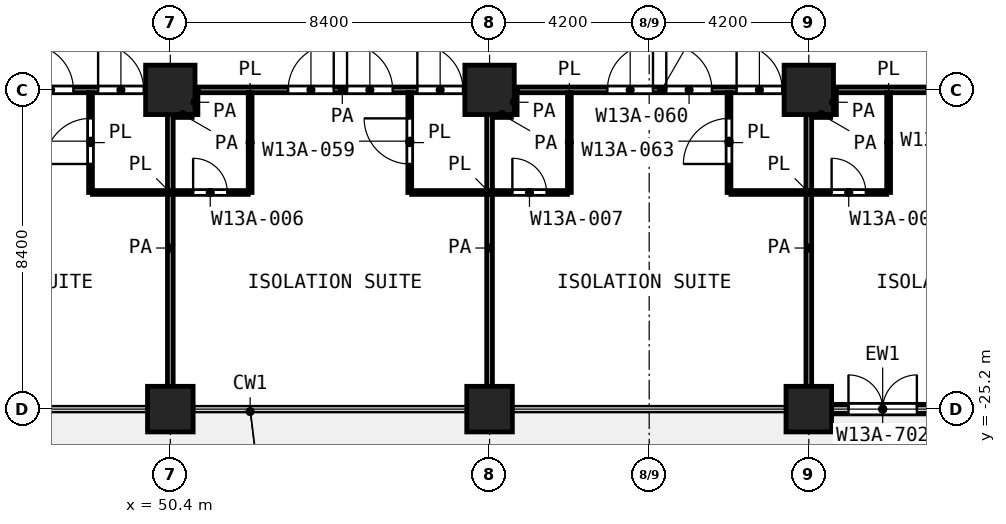
"""IFC4 building model, lengths in metres.
Left out: names, types, materials, properties, quantities, classifications, styles, units other than length and angle.
Written with IfcOpenShell. Run it as: python <this file> out.ifc"""

import sys

from ifc_helpers import new_model, si_unit, direction, frame, frame_2d, origin, origin_2d, place, context, subcontext, project, spatial, rectangle, extrude, element, fill, save


model = new_model("IFC4")
c1 = context("Model", 3, precision=1e-05, world=origin(), true_north=direction((0.0, 1.0)))
c2 = subcontext(c1, "Body", "Model", "MODEL_VIEW")
j1 = project(units=[si_unit("LENGTHUNIT", "METRE"), si_unit("PLANEANGLEUNIT", "RADIAN")], contexts=[c1])
p1 = place(None, origin())
s1 = spatial("IfcSite", under=j1, at=p1, CompositionType="ELEMENT")
p2 = place(p1, origin())
s2 = spatial("IfcBuilding", under=s1, at=p2, CompositionType="ELEMENT")
p3 = place(p2, frame((0.0, 0.0, 60.2)))
s3 = spatial("IfcBuildingStorey", under=s2, at=p3, CompositionType="ELEMENT", Elevation=60.2)
for number, where, z_axis, x_axis in (
    (1, (50.4, -16.8, 0.0), (0.0, 0.0, 1.0), (1.0, 0.0, 0.0)),
    (2, (58.8, -16.8, 0.0), (0.0, 0.0, 1.0), (1.0, 0.0, 0.0)),
    (3, (67.2, -16.8, 0.0), (0.0, 0.0, 1.0), (1.0, 0.0, 0.0)),
):
    element("IfcColumn", number, at=place(p3, frame(where, z_axis=z_axis, x_axis=x_axis)), inside=s3, PredefinedType="COLUMN", context=c2, shape_type="SweptSolid", body=[
        extrude(rectangle(XDim=1.3, YDim=1.3, at=origin_2d()), origin(), (0.0, 0.0, 1.0), 4.2),
    ])
for number, where, z_axis, x_axis in (
    (4, (50.4, -25.2, 0.0), (0.0, 0.0, 1.0), (1.0, 0.0, 0.0)),
    (5, (58.8, -25.2, 0.0), (0.0, 0.0, 1.0), (1.0, 0.0, 0.0)),
    (6, (67.2, -25.2, 0.0), (0.0, 0.0, 1.0), (1.0, 0.0, 0.0)),
):
    element("IfcColumn", number, at=place(p3, frame(where, z_axis=z_axis, x_axis=x_axis)), inside=s3, PredefinedType="COLUMN", context=c2, shape_type="SweptSolid", body=[
        extrude(rectangle(XDim=1.2, YDim=1.2, at=origin_2d()), origin(), (0.0, 0.0, 1.0), 4.2),
    ])
p4 = place(p3, frame((67.8, -25.2, 0.0), z_axis=(0.0, 0.0, 1.0), x_axis=(1.0, 0.0, 0.0)))
e7 = element("IfcWall", 7, at=p4, inside=s3, PredefinedType="SOLIDWALL", context=c2, shape_type="SweptSolid", body=[
    extrude(rectangle(XDim=2.688, YDim=0.25, at=frame_2d((1.344, 0.0))), origin(), (0.0, 0.0, 1.0), 3.78),
])
p5 = place(p4, frame((0.444, 0.0, 0.0)))
e8 = element("IfcOpeningElement", 8, at=p5, cuts=e7, PredefinedType="OPENING", context=c2, shape_type="SweptSolid", body=[
    extrude(rectangle(XDim=1.8, YDim=2.1, at=frame_2d((0.9, 1.05))), frame((0.0, 0.135, 0.0), z_axis=(0.0, -1.0, 0.0), x_axis=(1.0, 0.0, 0.0)), (0.0, 0.0, 1.0), 0.27),
])
p6 = place(p3, frame((48.35, -19.5, 0.0), z_axis=(0.0, 0.0, 1.0), x_axis=(1.0, 0.0, 0.0)))
e9 = element("IfcWall", 9, at=p6, inside=s3, PredefinedType="PARTITIONING", context=c2, shape_type="SweptSolid", body=[
    extrude(rectangle(XDim=4.1, YDim=0.1, at=frame_2d((2.05, 0.0))), origin(), (0.0, 0.0, 1.0), 3.9),
])
p7 = place(p6, frame((2.65, 0.0, 0.0)))
e10 = element("IfcOpeningElement", 10, at=p7, cuts=e9, PredefinedType="OPENING", context=c2, shape_type="SweptSolid", body=[
    extrude(rectangle(XDim=0.9, YDim=2.1, at=frame_2d((0.45, 1.05))), frame((0.0, 0.06, 0.0), z_axis=(0.0, -1.0, 0.0), x_axis=(1.0, 0.0, 0.0)), (0.0, 0.0, 1.0), 0.12),
])
p8 = place(p3, frame((56.75, -19.5, 0.0), z_axis=(0.0, 0.0, 1.0), x_axis=(1.0, 0.0, 0.0)))
e11 = element("IfcWall", 11, at=p8, inside=s3, PredefinedType="PARTITIONING", context=c2, shape_type="SweptSolid", body=[
    extrude(rectangle(XDim=4.1, YDim=0.1, at=frame_2d((2.05, 0.0))), origin(), (0.0, 0.0, 1.0), 3.9),
])
p9 = place(p8, frame((2.65, 0.0, 0.0)))
e12 = element("IfcOpeningElement", 12, at=p9, cuts=e11, PredefinedType="OPENING", context=c2, shape_type="SweptSolid", body=[
    extrude(rectangle(XDim=0.9, YDim=2.1, at=frame_2d((0.45, 1.05))), frame((0.0, 0.06, 0.0), z_axis=(0.0, -1.0, 0.0), x_axis=(1.0, 0.0, 0.0)), (0.0, 0.0, 1.0), 0.12),
])
p10 = place(p3, frame((65.15, -19.5, 0.0), z_axis=(0.0, 0.0, 1.0), x_axis=(1.0, 0.0, 0.0)))
e13 = element("IfcWall", 13, at=p10, inside=s3, PredefinedType="PARTITIONING", context=c2, shape_type="SweptSolid", body=[
    extrude(rectangle(XDim=4.1, YDim=0.1, at=frame_2d((2.05, 0.0))), origin(), (0.0, 0.0, 1.0), 3.9),
])
p11 = place(p10, frame((2.65, 0.0, 0.0)))
e14 = element("IfcOpeningElement", 14, at=p11, cuts=e13, PredefinedType="OPENING", context=c2, shape_type="SweptSolid", body=[
    extrude(rectangle(XDim=0.9, YDim=2.1, at=frame_2d((0.45, 1.05))), frame((0.0, 0.06, 0.0), z_axis=(0.0, -1.0, 0.0), x_axis=(1.0, 0.0, 0.0)), (0.0, 0.0, 1.0), 0.12),
])
p12 = place(p3, frame((48.3, -19.5, 0.0), z_axis=(0.0, 0.0, 1.0), x_axis=(0.0, 1.0, 0.0)))
e15 = element("IfcWall", 15, at=p12, inside=s3, PredefinedType="PARTITIONING", context=c2, shape_type="SweptSolid", body=[
    extrude(rectangle(XDim=2.625, YDim=0.1, at=frame_2d((1.312, 0.0))), origin(), (0.0, 0.0, 1.0), 3.9),
])
p13 = place(p12, frame((0.75, 0.0, 0.0)))
e16 = element("IfcOpeningElement", 16, at=p13, cuts=e15, PredefinedType="OPENING", context=c2, shape_type="SweptSolid", body=[
    extrude(rectangle(XDim=1.2, YDim=2.1, at=frame_2d((0.6, 1.05))), frame((0.0, 0.06, 0.0), z_axis=(0.0, -1.0, 0.0), x_axis=(1.0, 0.0, 0.0)), (0.0, 0.0, 1.0), 0.12),
])
p14 = place(p3, frame((52.5, -19.5, 0.0), z_axis=(0.0, 0.0, 1.0), x_axis=(0.0, 1.0, 0.0)))
e17 = element("IfcWall", 17, at=p14, inside=s3, PredefinedType="PARTITIONING", context=c2, shape_type="SweptSolid", body=[
    extrude(rectangle(XDim=2.625, YDim=0.1, at=frame_2d((1.312, 0.0))), origin(), (0.0, 0.0, 1.0), 3.9),
])
p15 = place(p3, frame((56.7, -19.5, 0.0), z_axis=(0.0, 0.0, 1.0), x_axis=(0.0, 1.0, 0.0)))
e18 = element("IfcWall", 18, at=p15, inside=s3, PredefinedType="PARTITIONING", context=c2, shape_type="SweptSolid", body=[
    extrude(rectangle(XDim=2.625, YDim=0.1, at=frame_2d((1.312, 0.0))), origin(), (0.0, 0.0, 1.0), 3.9),
])
p16 = place(p15, frame((0.75, 0.0, 0.0)))
e19 = element("IfcOpeningElement", 19, at=p16, cuts=e18, PredefinedType="OPENING", context=c2, shape_type="SweptSolid", body=[
    extrude(rectangle(XDim=1.2, YDim=2.1, at=frame_2d((0.6, 1.05))), frame((0.0, 0.06, 0.0), z_axis=(0.0, -1.0, 0.0), x_axis=(1.0, 0.0, 0.0)), (0.0, 0.0, 1.0), 0.12),
])
p17 = place(p3, frame((60.9, -19.5, 0.0), z_axis=(0.0, 0.0, 1.0), x_axis=(0.0, 1.0, 0.0)))
e20 = element("IfcWall", 20, at=p17, inside=s3, PredefinedType="PARTITIONING", context=c2, shape_type="SweptSolid", body=[
    extrude(rectangle(XDim=2.625, YDim=0.1, at=frame_2d((1.312, 0.0))), origin(), (0.0, 0.0, 1.0), 3.9),
])
p18 = place(p3, frame((65.1, -19.5, 0.0), z_axis=(0.0, 0.0, 1.0), x_axis=(0.0, 1.0, 0.0)))
e21 = element("IfcWall", 21, at=p18, inside=s3, PredefinedType="PARTITIONING", context=c2, shape_type="SweptSolid", body=[
    extrude(rectangle(XDim=2.625, YDim=0.1, at=frame_2d((1.312, 0.0))), origin(), (0.0, 0.0, 1.0), 3.9),
])
p19 = place(p18, frame((0.75, 0.0, 0.0)))
e22 = element("IfcOpeningElement", 22, at=p19, cuts=e21, PredefinedType="OPENING", context=c2, shape_type="SweptSolid", body=[
    extrude(rectangle(XDim=1.2, YDim=2.1, at=frame_2d((0.6, 1.05))), frame((0.0, 0.06, 0.0), z_axis=(0.0, -1.0, 0.0), x_axis=(1.0, 0.0, 0.0)), (0.0, 0.0, 1.0), 0.12),
])
p20 = place(p3, frame((69.3, -19.5, 0.0), z_axis=(0.0, 0.0, 1.0), x_axis=(0.0, 1.0, 0.0)))
e23 = element("IfcWall", 23, at=p20, inside=s3, PredefinedType="PARTITIONING", context=c2, shape_type="SweptSolid", body=[
    extrude(rectangle(XDim=2.625, YDim=0.1, at=frame_2d((1.312, 0.0))), origin(), (0.0, 0.0, 1.0), 3.9),
])
for number, where, z_axis, x_axis in (
    (24, (50.475, -17.45, 0.0), (0.0, 0.0, 1.0), (1.0, 0.0, 0.0)),
    (25, (58.875, -17.45, 0.0), (0.0, 0.0, 1.0), (1.0, 0.0, 0.0)),
    (26, (67.275, -17.45, 0.0), (0.0, 0.0, 1.0), (1.0, 0.0, 0.0)),
):
    element("IfcWall", number, at=place(p3, frame(where, z_axis=z_axis, x_axis=x_axis)), inside=s3, PredefinedType="PARTITIONING", context=c2, shape_type="SweptSolid", body=[
        extrude(rectangle(XDim=0.5, YDim=0.15, at=frame_2d((0.25, 0.0))), origin(), (0.0, 0.0, 1.0), 3.9),
    ])
p21 = place(p3, frame((42.727, -16.8, 0.0), z_axis=(0.0, 0.0, 1.0), x_axis=(1.0, 0.0, 0.0)))
e27 = element("IfcWall", 27, at=p21, inside=s3, PredefinedType="PARTITIONING", context=c2, shape_type="SweptSolid", body=[
    extrude(rectangle(XDim=7.595, YDim=0.15, at=frame_2d((3.797, 0.0))), origin(), (0.0, 0.0, 1.0), 3.9),
])
p22 = place(p21, frame((3.923, 0.0, 0.0)))
e28 = element("IfcOpeningElement", 28, at=p22, cuts=e27, PredefinedType="OPENING", context=c2, shape_type="SweptSolid", body=[
    extrude(rectangle(XDim=1.2, YDim=2.1, at=frame_2d((0.6, 1.05))), frame((0.0, 0.085, 0.0), z_axis=(0.0, -1.0, 0.0), x_axis=(1.0, 0.0, 0.0)), (0.0, 0.0, 1.0), 0.17),
])
p23 = place(p21, frame((2.373, 0.0, 0.0)))
e29 = element("IfcOpeningElement", 29, at=p23, cuts=e27, PredefinedType="OPENING", context=c2, shape_type="SweptSolid", body=[
    extrude(rectangle(XDim=1.2, YDim=2.1, at=frame_2d((0.6, 1.05))), frame((0.0, 0.085, 0.0), z_axis=(0.0, -1.0, 0.0), x_axis=(1.0, 0.0, 0.0)), (0.0, 0.0, 1.0), 0.17),
])
p24 = place(p21, frame((5.773, 0.0, 0.0)))
e30 = element("IfcOpeningElement", 30, at=p24, cuts=e27, PredefinedType="OPENING", context=c2, shape_type="SweptSolid", body=[
    extrude(rectangle(XDim=1.2, YDim=2.1, at=frame_2d((0.6, 1.05))), frame((0.0, 0.085, 0.0), z_axis=(0.0, -1.0, 0.0), x_axis=(1.0, 0.0, 0.0)), (0.0, 0.0, 1.0), 0.17),
])
p25 = place(p3, frame((51.128, -16.8, 0.0), z_axis=(0.0, 0.0, 1.0), x_axis=(1.0, 0.0, 0.0)))
e31 = element("IfcWall", 31, at=p25, inside=s3, PredefinedType="PARTITIONING", context=c2, shape_type="SweptSolid", body=[
    extrude(rectangle(XDim=7.594, YDim=0.15, at=frame_2d((3.797, 0.0))), origin(), (0.0, 0.0, 1.0), 3.9),
])
p26 = place(p25, frame((3.922, 0.0, 0.0)))
e32 = element("IfcOpeningElement", 32, at=p26, cuts=e31, PredefinedType="OPENING", context=c2, shape_type="SweptSolid", body=[
    extrude(rectangle(XDim=1.2, YDim=2.1, at=frame_2d((0.6, 1.05))), frame((0.0, 0.085, 0.0), z_axis=(0.0, -1.0, 0.0), x_axis=(1.0, 0.0, 0.0)), (0.0, 0.0, 1.0), 0.17),
])
p27 = place(p25, frame((2.372, 0.0, 0.0)))
e33 = element("IfcOpeningElement", 33, at=p27, cuts=e31, PredefinedType="OPENING", context=c2, shape_type="SweptSolid", body=[
    extrude(rectangle(XDim=1.2, YDim=2.1, at=frame_2d((0.6, 1.05))), frame((0.0, 0.085, 0.0), z_axis=(0.0, -1.0, 0.0), x_axis=(1.0, 0.0, 0.0)), (0.0, 0.0, 1.0), 0.17),
])
p28 = place(p25, frame((5.772, 0.0, 0.0)))
e34 = element("IfcOpeningElement", 34, at=p28, cuts=e31, PredefinedType="OPENING", context=c2, shape_type="SweptSolid", body=[
    extrude(rectangle(XDim=1.2, YDim=2.1, at=frame_2d((0.6, 1.05))), frame((0.0, 0.085, 0.0), z_axis=(0.0, -1.0, 0.0), x_axis=(1.0, 0.0, 0.0)), (0.0, 0.0, 1.0), 0.17),
])
p29 = place(p3, frame((59.528, -16.8, 0.0), z_axis=(0.0, 0.0, 1.0), x_axis=(1.0, 0.0, 0.0)))
e35 = element("IfcWall", 35, at=p29, inside=s3, PredefinedType="PARTITIONING", context=c2, shape_type="SweptSolid", body=[
    extrude(rectangle(XDim=7.594, YDim=0.15, at=frame_2d((3.797, 0.0))), origin(), (0.0, 0.0, 1.0), 3.9),
])
p30 = place(p29, frame((3.922, 0.0, 0.0)))
e36 = element("IfcOpeningElement", 36, at=p30, cuts=e35, PredefinedType="OPENING", context=c2, shape_type="SweptSolid", body=[
    extrude(rectangle(XDim=1.2, YDim=2.1, at=frame_2d((0.6, 1.05))), frame((0.0, 0.085, 0.0), z_axis=(0.0, -1.0, 0.0), x_axis=(1.0, 0.0, 0.0)), (0.0, 0.0, 1.0), 0.17),
])
p31 = place(p29, frame((2.372, 0.0, 0.0)))
e37 = element("IfcOpeningElement", 37, at=p31, cuts=e35, PredefinedType="OPENING", context=c2, shape_type="SweptSolid", body=[
    extrude(rectangle(XDim=1.2, YDim=2.1, at=frame_2d((0.6, 1.05))), frame((0.0, 0.085, 0.0), z_axis=(0.0, -1.0, 0.0), x_axis=(1.0, 0.0, 0.0)), (0.0, 0.0, 1.0), 0.17),
])
p32 = place(p29, frame((5.772, 0.0, 0.0)))
e38 = element("IfcOpeningElement", 38, at=p32, cuts=e35, PredefinedType="OPENING", context=c2, shape_type="SweptSolid", body=[
    extrude(rectangle(XDim=1.2, YDim=2.1, at=frame_2d((0.6, 1.05))), frame((0.0, 0.085, 0.0), z_axis=(0.0, -1.0, 0.0), x_axis=(1.0, 0.0, 0.0)), (0.0, 0.0, 1.0), 0.17),
])
p33 = place(p3, frame((67.928, -16.8, 0.0), z_axis=(0.0, 0.0, 1.0), x_axis=(1.0, 0.0, 0.0)))
e39 = element("IfcWall", 39, at=p33, inside=s3, PredefinedType="PARTITIONING", context=c2, shape_type="SweptSolid", body=[
    extrude(rectangle(XDim=11.792, YDim=0.15, at=frame_2d((5.896, 0.0))), origin(), (0.0, 0.0, 1.0), 3.9),
])
p34 = place(p33, frame((3.922, 0.0, 0.0)))
e40 = element("IfcOpeningElement", 40, at=p34, cuts=e39, PredefinedType="OPENING", context=c2, shape_type="SweptSolid", body=[
    extrude(rectangle(XDim=1.2, YDim=2.1, at=frame_2d((0.6, 1.05))), frame((0.0, 0.085, 0.0), z_axis=(0.0, -1.0, 0.0), x_axis=(1.0, 0.0, 0.0)), (0.0, 0.0, 1.0), 0.17),
])
p35 = place(p33, frame((2.372, 0.0, 0.0)))
e41 = element("IfcOpeningElement", 41, at=p35, cuts=e39, PredefinedType="OPENING", context=c2, shape_type="SweptSolid", body=[
    extrude(rectangle(XDim=1.2, YDim=2.1, at=frame_2d((0.6, 1.05))), frame((0.0, 0.085, 0.0), z_axis=(0.0, -1.0, 0.0), x_axis=(1.0, 0.0, 0.0)), (0.0, 0.0, 1.0), 0.17),
])
p36 = place(p33, frame((5.772, 0.0, 0.0)))
e42 = element("IfcOpeningElement", 42, at=p36, cuts=e39, PredefinedType="OPENING", context=c2, shape_type="SweptSolid", body=[
    extrude(rectangle(XDim=1.2, YDim=2.1, at=frame_2d((0.6, 1.05))), frame((0.0, 0.085, 0.0), z_axis=(0.0, -1.0, 0.0), x_axis=(1.0, 0.0, 0.0)), (0.0, 0.0, 1.0), 0.17),
])
p37 = place(p33, frame((9.272, 0.0, 0.0)))
e43 = element("IfcOpeningElement", 43, at=p37, cuts=e39, PredefinedType="OPENING", context=c2, shape_type="SweptSolid", body=[
    extrude(rectangle(XDim=1.0, YDim=2.1, at=frame_2d((0.5, 1.05))), frame((0.0, 0.085, 0.0), z_axis=(0.0, -1.0, 0.0), x_axis=(1.0, 0.0, 0.0)), (0.0, 0.0, 1.0), 0.17),
])
p38 = place(p3, frame((50.4, -25.12, 0.0), z_axis=(0.0, 0.0, 1.0), x_axis=(0.0, 1.0, 0.0)))
e44 = element("IfcWall", 44, at=p38, inside=s3, PredefinedType="PARTITIONING", context=c2, shape_type="SweptSolid", body=[
    extrude(rectangle(XDim=8.317, YDim=0.15, at=frame_2d((4.159, 0.0))), origin(), (0.0, 0.0, 1.0), 3.9),
])
p39 = place(p3, frame((51.05, -17.45, 0.0), z_axis=(0.0, 0.0, 1.0), x_axis=(0.0, 1.0, 0.0)))
e45 = element("IfcWall", 45, at=p39, inside=s3, PredefinedType="PARTITIONING", context=c2, shape_type="SweptSolid", body=[
    extrude(rectangle(XDim=0.647, YDim=0.15, at=frame_2d((0.323, 0.0))), origin(), (0.0, 0.0, 1.0), 3.9),
])
p40 = place(p3, frame((58.8, -25.12, 0.0), z_axis=(0.0, 0.0, 1.0), x_axis=(0.0, 1.0, 0.0)))
e46 = element("IfcWall", 46, at=p40, inside=s3, PredefinedType="PARTITIONING", context=c2, shape_type="SweptSolid", body=[
    extrude(rectangle(XDim=8.317, YDim=0.15, at=frame_2d((4.159, 0.0))), origin(), (0.0, 0.0, 1.0), 3.9),
])
p41 = place(p3, frame((59.45, -17.45, 0.0), z_axis=(0.0, 0.0, 1.0), x_axis=(0.0, 1.0, 0.0)))
e47 = element("IfcWall", 47, at=p41, inside=s3, PredefinedType="PARTITIONING", context=c2, shape_type="SweptSolid", body=[
    extrude(rectangle(XDim=0.647, YDim=0.15, at=frame_2d((0.323, 0.0))), origin(), (0.0, 0.0, 1.0), 3.9),
])
p42 = place(p3, frame((67.2, -25.12, 0.0), z_axis=(0.0, 0.0, 1.0), x_axis=(0.0, 1.0, 0.0)))
e48 = element("IfcWall", 48, at=p42, inside=s3, PredefinedType="PARTITIONING", context=c2, shape_type="SweptSolid", body=[
    extrude(rectangle(XDim=8.317, YDim=0.15, at=frame_2d((4.159, 0.0))), origin(), (0.0, 0.0, 1.0), 3.9),
])
p43 = place(p3, frame((67.85, -17.45, 0.0), z_axis=(0.0, 0.0, 1.0), x_axis=(0.0, 1.0, 0.0)))
e49 = element("IfcWall", 49, at=p43, inside=s3, PredefinedType="PARTITIONING", context=c2, shape_type="SweptSolid", body=[
    extrude(rectangle(XDim=0.647, YDim=0.15, at=frame_2d((0.323, 0.0))), origin(), (0.0, 0.0, 1.0), 3.9),
])
p44 = place(p5, origin())
e50 = element("IfcDoor", 50, at=p44, inside=s3, OperationType="DOUBLE_DOOR_SINGLE_SWING", PredefinedType="DOOR", context=c2, shape_type="SweptSolid", body=[
    extrude(rectangle(XDim=1.8, YDim=2.1, at=frame_2d((0.9, 1.05))), frame((0.0, 0.025, 0.0), z_axis=(0.0, -1.0, 0.0), x_axis=(1.0, 0.0, 0.0)), (0.0, 0.0, 1.0), 0.05),
])
fill(e8, e50)
p45 = place(p22, origin())
e51 = element("IfcDoor", 51, at=p45, inside=s3, OperationType="SINGLE_SWING_LEFT", PredefinedType="DOOR", context=c2, shape_type="SweptSolid", body=[
    extrude(rectangle(XDim=1.2, YDim=2.1, at=frame_2d((0.6, 1.05))), frame((0.0, 0.025, 0.0), z_axis=(0.0, -1.0, 0.0), x_axis=(1.0, 0.0, 0.0)), (0.0, 0.0, 1.0), 0.05),
])
fill(e28, e51)
p46 = place(p24, origin())
e52 = element("IfcDoor", 52, at=p46, inside=s3, OperationType="SINGLE_SWING_LEFT", PredefinedType="DOOR", context=c2, shape_type="SweptSolid", body=[
    extrude(rectangle(XDim=1.2, YDim=2.1, at=frame_2d((0.6, 1.05))), frame((0.0, 0.025, 0.0), z_axis=(0.0, -1.0, 0.0), x_axis=(1.0, 0.0, 0.0)), (0.0, 0.0, 1.0), 0.05),
])
fill(e30, e52)
p47 = place(p13, origin())
e53 = element("IfcDoor", 53, at=p47, inside=s3, OperationType="SINGLE_SWING_LEFT", PredefinedType="DOOR", context=c2, shape_type="SweptSolid", body=[
    extrude(rectangle(XDim=1.2, YDim=2.1, at=frame_2d((0.6, 1.05))), frame((0.0, 0.025, 0.0), z_axis=(0.0, -1.0, 0.0), x_axis=(1.0, 0.0, 0.0)), (0.0, 0.0, 1.0), 0.05),
])
fill(e16, e53)
p48 = place(p26, origin())
e54 = element("IfcDoor", 54, at=p48, inside=s3, OperationType="SINGLE_SWING_LEFT", PredefinedType="DOOR", context=c2, shape_type="SweptSolid", body=[
    extrude(rectangle(XDim=1.2, YDim=2.1, at=frame_2d((0.6, 1.05))), frame((0.0, 0.025, 0.0), z_axis=(0.0, -1.0, 0.0), x_axis=(1.0, 0.0, 0.0)), (0.0, 0.0, 1.0), 0.05),
])
fill(e32, e54)
p49 = place(p27, origin())
e55 = element("IfcDoor", 55, at=p49, inside=s3, OperationType="SINGLE_SWING_RIGHT", PredefinedType="DOOR", context=c2, shape_type="SweptSolid", body=[
    extrude(rectangle(XDim=1.2, YDim=2.1, at=frame_2d((0.6, 1.05))), frame((0.0, 0.025, 0.0), z_axis=(0.0, -1.0, 0.0), x_axis=(1.0, 0.0, 0.0)), (0.0, 0.0, 1.0), 0.05),
])
fill(e33, e55)
p50 = place(p28, origin())
e56 = element("IfcDoor", 56, at=p50, inside=s3, OperationType="SINGLE_SWING_LEFT", PredefinedType="DOOR", context=c2, shape_type="SweptSolid", body=[
    extrude(rectangle(XDim=1.2, YDim=2.1, at=frame_2d((0.6, 1.05))), frame((0.0, 0.025, 0.0), z_axis=(0.0, -1.0, 0.0), x_axis=(1.0, 0.0, 0.0)), (0.0, 0.0, 1.0), 0.05),
])
fill(e34, e56)
p51 = place(p16, origin())
e57 = element("IfcDoor", 57, at=p51, inside=s3, OperationType="SINGLE_SWING_RIGHT", PredefinedType="DOOR", context=c2, shape_type="SweptSolid", body=[
    extrude(rectangle(XDim=1.2, YDim=2.1, at=frame_2d((0.6, 1.05))), frame((0.0, 0.025, 0.0), z_axis=(0.0, -1.0, 0.0), x_axis=(1.0, 0.0, 0.0)), (0.0, 0.0, 1.0), 0.05),
])
fill(e19, e57)
p52 = place(p7, origin())
e58 = element("IfcDoor", 58, at=p52, inside=s3, OperationType="SINGLE_SWING_LEFT", PredefinedType="DOOR", context=c2, shape_type="SweptSolid", body=[
    extrude(rectangle(XDim=0.9, YDim=2.1, at=frame_2d((0.45, 1.05))), frame((0.0, 0.025, 0.0), z_axis=(0.0, -1.0, 0.0), x_axis=(1.0, 0.0, 0.0)), (0.0, 0.0, 1.0), 0.05),
])
fill(e10, e58)
p53 = place(p30, origin())
e59 = element("IfcDoor", 59, at=p53, inside=s3, OperationType="SINGLE_SWING_LEFT", PredefinedType="DOOR", context=c2, shape_type="SweptSolid", body=[
    extrude(rectangle(XDim=1.2, YDim=2.1, at=frame_2d((0.6, 1.05))), frame((0.0, 0.025, 0.0), z_axis=(0.0, -1.0, 0.0), x_axis=(1.0, 0.0, 0.0)), (0.0, 0.0, 1.0), 0.05),
])
fill(e36, e59)
p54 = place(p31, origin())
e60 = element("IfcDoor", 60, at=p54, inside=s3, OperationType="SINGLE_SWING_RIGHT", PredefinedType="DOOR", context=c2, shape_type="SweptSolid", body=[
    extrude(rectangle(XDim=1.2, YDim=2.1, at=frame_2d((0.6, 1.05))), frame((0.0, 0.025, 0.0), z_axis=(0.0, -1.0, 0.0), x_axis=(1.0, 0.0, 0.0)), (0.0, 0.0, 1.0), 0.05),
])
fill(e37, e60)
p55 = place(p32, origin())
e61 = element("IfcDoor", 61, at=p55, inside=s3, OperationType="SINGLE_SWING_LEFT", PredefinedType="DOOR", context=c2, shape_type="SweptSolid", body=[
    extrude(rectangle(XDim=1.2, YDim=2.1, at=frame_2d((0.6, 1.05))), frame((0.0, 0.025, 0.0), z_axis=(0.0, -1.0, 0.0), x_axis=(1.0, 0.0, 0.0)), (0.0, 0.0, 1.0), 0.05),
])
fill(e38, e61)
p56 = place(p19, origin())
e62 = element("IfcDoor", 62, at=p56, inside=s3, OperationType="SINGLE_SWING_LEFT", PredefinedType="DOOR", context=c2, shape_type="SweptSolid", body=[
    extrude(rectangle(XDim=1.2, YDim=2.1, at=frame_2d((0.6, 1.05))), frame((0.0, 0.025, 0.0), z_axis=(0.0, -1.0, 0.0), x_axis=(1.0, 0.0, 0.0)), (0.0, 0.0, 1.0), 0.05),
])
fill(e22, e62)
p57 = place(p9, origin())
e63 = element("IfcDoor", 63, at=p57, inside=s3, OperationType="SINGLE_SWING_LEFT", PredefinedType="DOOR", context=c2, shape_type="SweptSolid", body=[
    extrude(rectangle(XDim=0.9, YDim=2.1, at=frame_2d((0.45, 1.05))), frame((0.0, 0.025, 0.0), z_axis=(0.0, -1.0, 0.0), x_axis=(1.0, 0.0, 0.0)), (0.0, 0.0, 1.0), 0.05),
])
fill(e12, e63)
p58 = place(p11, origin())
e64 = element("IfcDoor", 64, at=p58, inside=s3, OperationType="SINGLE_SWING_LEFT", PredefinedType="DOOR", context=c2, shape_type="SweptSolid", body=[
    extrude(rectangle(XDim=0.9, YDim=2.1, at=frame_2d((0.45, 1.05))), frame((0.0, 0.025, 0.0), z_axis=(0.0, -1.0, 0.0), x_axis=(1.0, 0.0, 0.0)), (0.0, 0.0, 1.0), 0.05),
])
fill(e14, e64)
save(model, sys.argv[1])
